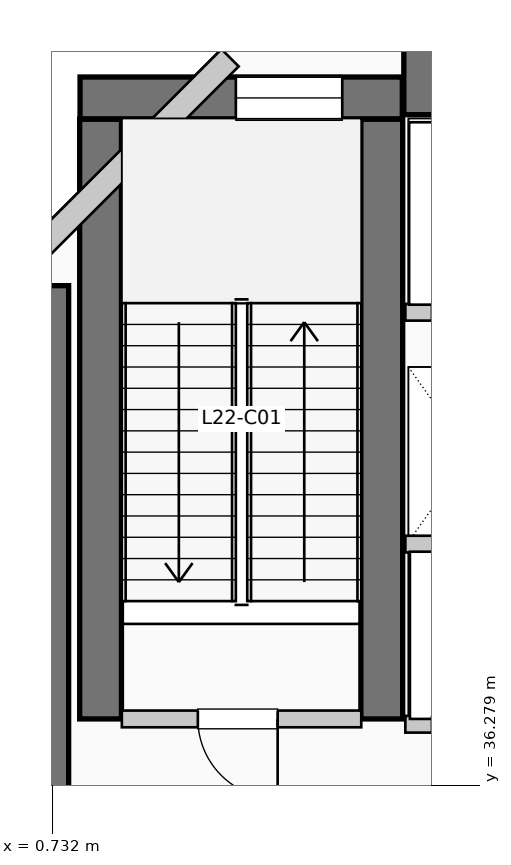
"""IFC4 building model, lengths in metres.
Left out: names, types, materials, properties, quantities, classifications, styles, units other than length and angle.
Written with IfcOpenShell. Run it as: python <this file> out.ifc"""

import sys

from ifc_helpers import new_model, si_unit, direction, frame, frame_2d, origin, place, context, subcontext, project, spatial, rectangle, extrude, element, fill, save


model = new_model("IFC4")
c1 = context("Model", 3, precision=1e-05, world=origin(), true_north=direction((0.0, 1.0)))
c2 = subcontext(c1, "Body", "Model", "MODEL_VIEW")
j1 = project(units=[si_unit("LENGTHUNIT", "METRE"), si_unit("PLANEANGLEUNIT", "RADIAN")], contexts=[c1])
p1 = place(None, origin())
s1 = spatial("IfcSite", under=j1, at=p1, CompositionType="ELEMENT")
p2 = place(p1, origin())
s2 = spatial("IfcBuilding", under=s1, at=p2, CompositionType="ELEMENT")
p3 = place(p2, frame((0.0, 0.0, 93.72)))
s3 = spatial("IfcBuildingStorey", under=s2, at=p3, CompositionType="ELEMENT", Elevation=93.72)
p4 = place(p3, frame((5.36, 45.55, 0.0), z_axis=(0.0, 0.0, 1.0), x_axis=(1.0, 0.0, 0.0)))
e1 = element("IfcWall", 1, at=p4, inside=s3, PredefinedType="SHEAR", context=c2, shape_type="SweptSolid", body=[
    extrude(rectangle(XDim=13.98, YDim=0.9, at=frame_2d((6.99, 0.0))), origin(), (0.0, 0.0, 1.0), 4.95),
])
p5 = place(p3, frame((0.5, 34.95, 0.0), z_axis=(0.0, 0.0, 1.0), x_axis=(0.0, 1.0, 0.0)))
e2 = element("IfcWall", 2, at=p5, inside=s3, PredefinedType="SHEAR", context=c2, shape_type="SweptSolid", body=[
    extrude(rectangle(XDim=7.9, YDim=0.9, at=frame_2d((3.95, 0.0))), origin(), (0.0, 0.0, 1.0), 4.95),
])
for number, where, z_axis, x_axis in (
    (3, (1.37, 37.15, 0.0), (0.0, 0.0, 1.0), (0.0, 1.0, 0.0)),
    (4, (5.07, 37.15, 0.0), (0.0, 0.0, 1.0), (0.0, 1.0, 0.0)),
):
    element("IfcWall", number, at=place(p3, frame(where, z_axis=z_axis, x_axis=x_axis)), inside=s3, PredefinedType="SHEAR", context=c2, shape_type="SweptSolid", body=[
        extrude(rectangle(XDim=7.89, YDim=0.55, at=frame_2d((3.945, 0.0))), origin(), (0.0, 0.0, 1.0), 4.95),
    ])
p6 = place(p3, frame((1.1, 45.32, 0.0), z_axis=(0.0, 0.0, 1.0), x_axis=(1.0, 0.0, 0.0)))
e5 = element("IfcWall", 5, at=p6, inside=s3, PredefinedType="SHEAR", context=c2, shape_type="SweptSolid", body=[
    extrude(rectangle(XDim=4.24, YDim=0.55, at=frame_2d((2.12, 0.0))), origin(), (0.0, 0.0, 1.0), 4.95),
])
p7 = place(p6, frame((2.05, 0.0, 1.05)))
e6 = element("IfcOpeningElement", 6, at=p7, cuts=e5, PredefinedType="OPENING", context=c2, shape_type="SweptSolid", body=[
    extrude(rectangle(XDim=1.4, YDim=1.8, at=frame_2d((0.7, 0.9))), frame((0.0, 0.285, 0.0), z_axis=(0.0, -1.0, 0.0), x_axis=(1.0, 0.0, 0.0)), (0.0, 0.0, 1.0), 0.57),
])
p8 = place(p3, frame((3.074, 45.848, 0.0), z_axis=(0.0, 0.0, 1.0), x_axis=(-0.707106781187, -0.707106781187, 0.0)))
e7 = element("IfcWall", 7, at=p8, inside=s3, PredefinedType="SOLIDWALL", context=c2, shape_type="SweptSolid", body=[
    extrude(rectangle(XDim=4.133, YDim=0.32, at=frame_2d((2.066, 0.0))), origin(), (0.0, 0.0, 1.0), 4.7),
])
p9 = place(p3, frame((1.65, 37.15, 0.0), z_axis=(0.0, 0.0, 1.0), x_axis=(1.0, 0.0, 0.0)))
e8 = element("IfcWall", 8, at=p9, inside=s3, PredefinedType="PARTITIONING", context=c2, shape_type="SweptSolid", body=[
    extrude(rectangle(XDim=3.15, YDim=0.22, at=frame_2d((1.575, 0.0))), origin(), (0.0, 0.0, 1.0), 4.7),
])
p10 = place(p9, frame((2.05, 0.0, 0.0), z_axis=(0.0, 0.0, 1.0), x_axis=(-1.0, 0.0, 0.0)))
e9 = element("IfcOpeningElement", 9, at=p10, cuts=e8, PredefinedType="OPENING", context=c2, shape_type="SweptSolid", body=[
    extrude(rectangle(XDim=1.05, YDim=2.15, at=frame_2d((0.525, 1.075))), frame((0.0, 0.12, 0.0), z_axis=(0.0, -1.0, 0.0), x_axis=(1.0, 0.0, 0.0)), (0.0, 0.0, 1.0), 0.24),
])
p11 = place(p3, frame((5.38, 37.08, 0.0), z_axis=(0.0, 0.0, 1.0), x_axis=(1.0, 0.0, 0.0)))
e10 = element("IfcWall", 10, at=p11, inside=s3, PredefinedType="PARTITIONING", context=c2, shape_type="SweptSolid", body=[
    extrude(rectangle(XDim=3.46, YDim=0.22, at=frame_2d((1.73, 0.0))), origin(), (0.0, 0.0, 1.0), 4.7),
])
p12 = place(p11, frame((1.55, 0.0, 0.0), z_axis=(0.0, 0.0, 1.0), x_axis=(-1.0, 0.0, 0.0)))
e11 = element("IfcOpeningElement", 11, at=p12, cuts=e10, PredefinedType="OPENING", context=c2, shape_type="SweptSolid", body=[
    extrude(rectangle(XDim=1.2, YDim=2.2, at=frame_2d((0.6, 1.1))), frame((0.0, 0.12, 0.0), z_axis=(0.0, -1.0, 0.0), x_axis=(1.0, 0.0, 0.0)), (0.0, 0.0, 1.0), 0.24),
])
p13 = place(p11, frame((3.22, 0.0, 0.0), z_axis=(0.0, 0.0, 1.0), x_axis=(-1.0, 0.0, 0.0)))
e12 = element("IfcOpeningElement", 12, at=p13, cuts=e10, PredefinedType="OPENING", context=c2, shape_type="SweptSolid", body=[
    extrude(rectangle(XDim=1.2, YDim=2.2, at=frame_2d((0.6, 1.1))), frame((0.0, 0.12, 0.0), z_axis=(0.0, -1.0, 0.0), x_axis=(1.0, 0.0, 0.0)), (0.0, 0.0, 1.0), 0.24),
])
p14 = place(p3, frame((5.38, 39.45, 0.0), z_axis=(0.0, 0.0, 1.0), x_axis=(1.0, 0.0, 0.0)))
e13 = element("IfcWall", 13, at=p14, inside=s3, PredefinedType="PARTITIONING", context=c2, shape_type="SweptSolid", body=[
    extrude(rectangle(XDim=3.46, YDim=0.22, at=frame_2d((1.73, 0.0))), origin(), (0.0, 0.0, 1.0), 4.7),
])
p15 = place(p3, frame((5.38, 42.5, 0.0), z_axis=(0.0, 0.0, 1.0), x_axis=(1.0, 0.0, 0.0)))
e14 = element("IfcWall", 14, at=p15, inside=s3, PredefinedType="PARTITIONING", context=c2, shape_type="SweptSolid", body=[
    extrude(rectangle(XDim=3.77, YDim=0.22, at=frame_2d((1.885, 0.0))), origin(), (0.0, 0.0, 1.0), 4.7),
])
p16 = place(p15, frame((1.75, 0.0, 0.0), z_axis=(0.0, 0.0, 1.0), x_axis=(-1.0, 0.0, 0.0)))
e15 = element("IfcOpeningElement", 15, at=p16, cuts=e14, PredefinedType="OPENING", context=c2, shape_type="SweptSolid", body=[
    extrude(rectangle(XDim=1.4, YDim=2.2, at=frame_2d((0.7, 1.1))), frame((0.0, 0.12, 0.0), z_axis=(0.0, -1.0, 0.0), x_axis=(1.0, 0.0, 0.0)), (0.0, 0.0, 1.0), 0.24),
])
p17 = place(p15, frame((3.53, 0.0, 0.0), z_axis=(0.0, 0.0, 1.0), x_axis=(-1.0, 0.0, 0.0)))
e16 = element("IfcOpeningElement", 16, at=p17, cuts=e14, PredefinedType="OPENING", context=c2, shape_type="SweptSolid", body=[
    extrude(rectangle(XDim=1.4, YDim=2.2, at=frame_2d((0.7, 1.1))), frame((0.0, 0.12, 0.0), z_axis=(0.0, -1.0, 0.0), x_axis=(1.0, 0.0, 0.0)), (0.0, 0.0, 1.0), 0.24),
])
p18 = place(p7, origin())
e17 = element("IfcWindow", 17, at=p18, inside=s3, PartitioningType="SINGLE_PANEL", PredefinedType="WINDOW", context=c2, shape_type="SweptSolid", body=[
    extrude(rectangle(XDim=1.4, YDim=1.8, at=frame_2d((0.7, 0.9))), frame((0.0, 0.03, 0.0), z_axis=(0.0, -1.0, 0.0), x_axis=(1.0, 0.0, 0.0)), (0.0, 0.0, 1.0), 0.06),
])
fill(e6, e17)
p19 = place(p10, origin())
e18 = element("IfcDoor", 18, at=p19, inside=s3, OperationType="SINGLE_SWING_RIGHT", PredefinedType="DOOR", context=c2, shape_type="SweptSolid", body=[
    extrude(rectangle(XDim=1.05, YDim=2.15, at=frame_2d((0.525, 1.075))), frame((0.0, 0.025, 0.0), z_axis=(0.0, -1.0, 0.0), x_axis=(1.0, 0.0, 0.0)), (0.0, 0.0, 1.0), 0.05),
])
fill(e9, e18)
save(model, sys.argv[1])
